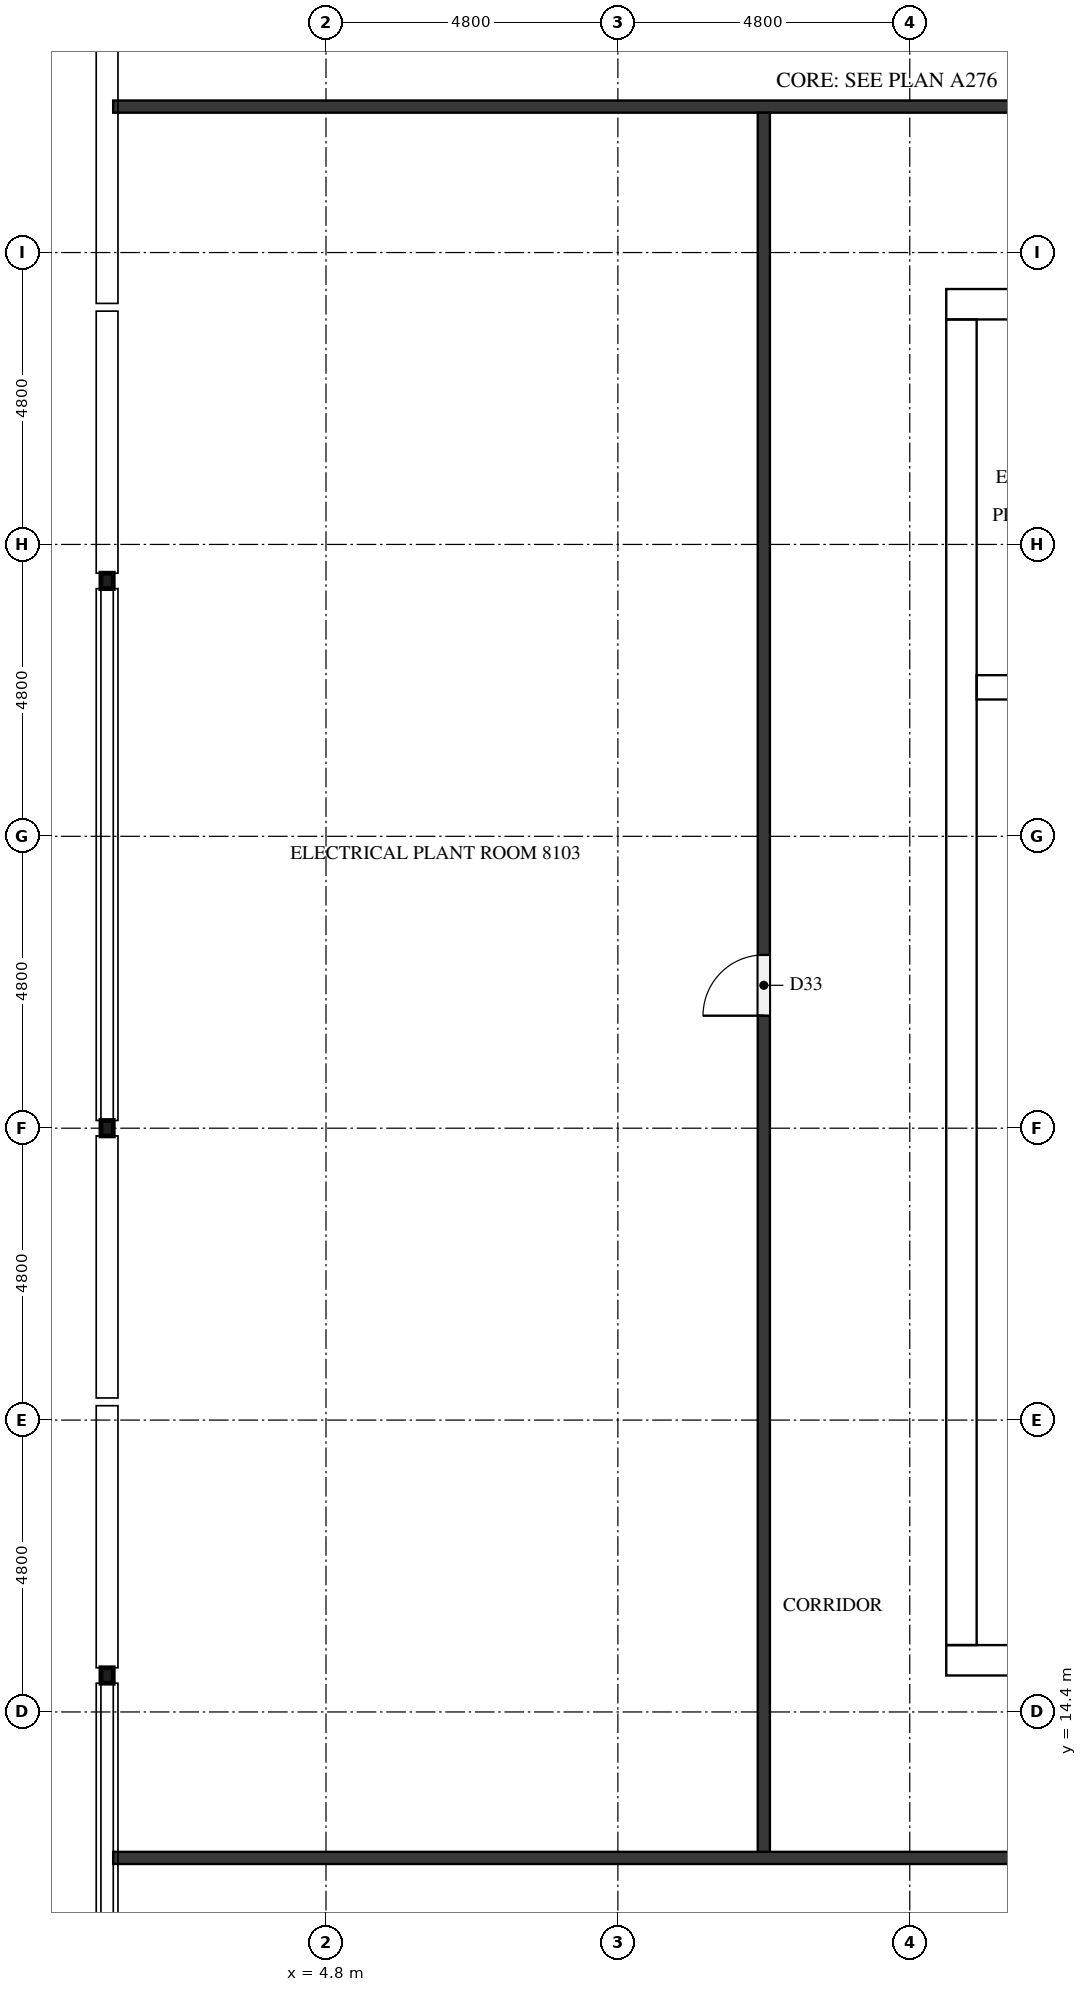
"""IFC4 building model, lengths in metres.
Left out: names, types, materials, properties, quantities, classifications, styles, units other than length and angle.
Written with IfcOpenShell. Run it as: python <this file> out.ifc"""

import sys

from ifc_helpers import new_model, si_unit, direction, frame, frame_2d, origin, origin_2d, place, context, subcontext, project, spatial, rectangle, hollow_rectangle, extrude, element, fill, save


model = new_model("IFC4")
c1 = context("Model", 3, precision=1e-05, world=origin(), true_north=direction((0.0, 1.0)))
c2 = subcontext(c1, "Body", "Model", "MODEL_VIEW")
j1 = project(units=[si_unit("LENGTHUNIT", "METRE"), si_unit("PLANEANGLEUNIT", "RADIAN")], contexts=[c1])
p1 = place(None, origin())
s1 = spatial("IfcSite", under=j1, at=p1, CompositionType="ELEMENT")
p2 = place(p1, origin())
s2 = spatial("IfcBuilding", under=s1, at=p2, CompositionType="ELEMENT")
p3 = place(p2, frame((0.0, 0.0, 314.3)))
s3 = spatial("IfcBuildingStorey", under=s2, at=p3, CompositionType="ELEMENT", Elevation=314.3)
p4 = place(p3, frame((15.0, 15.25, 0.0), z_axis=(0.0, 0.0, 1.0), x_axis=(1.0, 0.0, 0.0)))
e1 = element("IfcWall", 1, at=p4, inside=s3, PredefinedType="SHEAR", context=c2, shape_type="SweptSolid", body=[
    extrude(rectangle(XDim=32.4, YDim=0.5, at=frame_2d((16.2, 0.0))), origin(), (0.0, 0.0, 1.0), 2.6),
])
p5 = place(p4, frame((15.3, 0.0, 0.0)))
e2 = element("IfcOpeningElement", 2, at=p5, cuts=e1, PredefinedType="OPENING", context=c2, shape_type="SweptSolid", body=[
    extrude(rectangle(XDim=1.8, YDim=2.1, at=frame_2d((0.9, 1.05))), frame((0.0, 0.26, 0.0), z_axis=(0.0, -1.0, 0.0), x_axis=(1.0, 0.0, 0.0)), (0.0, 0.0, 1.0), 0.52),
])
p6 = place(p3, frame((15.0, 37.55, 0.0), z_axis=(0.0, 0.0, 1.0), x_axis=(1.0, 0.0, 0.0)))
e3 = element("IfcWall", 3, at=p6, inside=s3, PredefinedType="SHEAR", context=c2, shape_type="SweptSolid", body=[
    extrude(rectangle(XDim=32.4, YDim=0.5, at=frame_2d((16.2, 0.0))), origin(), (0.0, 0.0, 1.0), 2.6),
])
p7 = place(p6, frame((15.3, 0.0, 0.0)))
e4 = element("IfcOpeningElement", 4, at=p7, cuts=e3, PredefinedType="OPENING", context=c2, shape_type="SweptSolid", body=[
    extrude(rectangle(XDim=1.8, YDim=2.1, at=frame_2d((0.9, 1.05))), frame((0.0, 0.26, 0.0), z_axis=(0.0, -1.0, 0.0), x_axis=(1.0, 0.0, 0.0)), (0.0, 0.0, 1.0), 0.52),
])
p8 = place(p6, frame((1.282, 0.0, 0.0)))
e5 = element("IfcOpeningElement", 5, at=p8, cuts=e3, PredefinedType="OPENING", context=c2, shape_type="SweptSolid", body=[
    extrude(rectangle(XDim=1.0, YDim=2.1, at=frame_2d((0.5, 1.05))), frame((0.0, 0.26, 0.0), z_axis=(0.0, -1.0, 0.0), x_axis=(1.0, 0.0, 0.0)), (0.0, 0.0, 1.0), 0.52),
])
p9 = place(p6, frame((5.082, 0.0, 0.0)))
e6 = element("IfcOpeningElement", 6, at=p9, cuts=e3, PredefinedType="OPENING", context=c2, shape_type="SweptSolid", body=[
    extrude(rectangle(XDim=1.0, YDim=2.1, at=frame_2d((0.5, 1.05))), frame((0.0, 0.26, 0.0), z_axis=(0.0, -1.0, 0.0), x_axis=(1.0, 0.0, 0.0)), (0.0, 0.0, 1.0), 0.52),
])
p10 = place(p3, frame((15.25, 15.5, 0.0), z_axis=(0.0, 0.0, 1.0), x_axis=(0.0, 1.0, 0.0)))
e7 = element("IfcWall", 7, at=p10, inside=s3, PredefinedType="SHEAR", context=c2, shape_type="SweptSolid", body=[
    extrude(rectangle(XDim=21.8, YDim=0.5, at=frame_2d((10.9, 0.0))), origin(), (0.0, 0.0, 1.0), 2.6),
])
p11 = place(p10, frame((5.26, 0.0, 0.0)))
e8 = element("IfcOpeningElement", 8, at=p11, cuts=e7, PredefinedType="OPENING", context=c2, shape_type="SweptSolid", body=[
    extrude(rectangle(XDim=1.2, YDim=2.1, at=frame_2d((0.6, 1.05))), frame((0.0, 0.26, 0.0), z_axis=(0.0, -1.0, 0.0), x_axis=(1.0, 0.0, 0.0)), (0.0, 0.0, 1.0), 0.52),
])
p12 = place(p3, frame((15.5, 31.25, 0.0), z_axis=(0.0, 0.0, 1.0), x_axis=(1.0, 0.0, 0.0)))
e9 = element("IfcWall", 9, at=p12, inside=s3, PredefinedType="SHEAR", context=c2, shape_type="SweptSolid", body=[
    extrude(rectangle(XDim=7.4, YDim=0.4, at=frame_2d((3.7, 0.0))), origin(), (0.0, 0.0, 1.0), 2.6),
])
for number, where, z_axis, x_axis in (
    (10, (1.2, 33.0, 0.0), (0.0, 0.0, 1.0), (1.0, 0.0, 0.0)),
    (11, (1.2, 24.0, 0.0), (0.0, 0.0, 1.0), (1.0, 0.0, 0.0)),
    (12, (1.2, 15.0, 0.0), (0.0, 0.0, 1.0), (1.0, 0.0, 0.0)),
):
    element("IfcColumn", number, at=place(p3, frame(where, z_axis=z_axis, x_axis=x_axis)), inside=s3, PredefinedType="COLUMN", context=c2, shape_type="SweptSolid", body=[
        extrude(hollow_rectangle(XDim=0.203, YDim=0.254, WallThickness=0.01, InnerFilletRadius=0.004, OuterFilletRadius=0.013, at=origin_2d()), origin(), (0.0, 0.0, 1.0), 2.6),
    ])
p13 = place(p3, frame((56.3, 12.0, 0.0), z_axis=(0.0, 0.0, 1.0), x_axis=(-1.0, 0.0, 0.0)))
e13 = element("IfcWall", 13, at=p13, inside=s3, PredefinedType="PARTITIONING", context=c2, shape_type="SweptSolid", body=[
    extrude(rectangle(XDim=55.0, YDim=0.2, at=frame_2d((27.5, 0.0))), origin(), (0.0, 0.0, 1.0), 2.6),
])
p14 = place(p13, frame((24.55, 0.0, 0.0)))
e14 = element("IfcOpeningElement", 14, at=p14, cuts=e13, PredefinedType="OPENING", context=c2, shape_type="SweptSolid", body=[
    extrude(rectangle(XDim=1.0, YDim=2.1, at=frame_2d((0.5, 1.05))), frame((0.0, 0.11, 0.0), z_axis=(0.0, -1.0, 0.0), x_axis=(1.0, 0.0, 0.0)), (0.0, 0.0, 1.0), 0.22),
])
p15 = place(p3, frame((1.3, 40.8, 0.0), z_axis=(0.0, 0.0, 1.0), x_axis=(1.0, 0.0, 0.0)))
e15 = element("IfcWall", 15, at=p15, inside=s3, PredefinedType="PARTITIONING", context=c2, shape_type="SweptSolid", body=[
    extrude(rectangle(XDim=55.0, YDim=0.2, at=frame_2d((27.5, 0.0))), origin(), (0.0, 0.0, 1.0), 2.6),
])
p16 = place(p15, frame((29.35, 0.0, 0.0)))
e16 = element("IfcOpeningElement", 16, at=p16, cuts=e15, PredefinedType="OPENING", context=c2, shape_type="SweptSolid", body=[
    extrude(rectangle(XDim=1.0, YDim=2.1, at=frame_2d((0.5, 1.05))), frame((0.0, 0.11, 0.0), z_axis=(0.0, -1.0, 0.0), x_axis=(1.0, 0.0, 0.0)), (0.0, 0.0, 1.0), 0.22),
])
p17 = place(p3, frame((12.0, 12.1, 0.0), z_axis=(0.0, 0.0, 1.0), x_axis=(0.0, 1.0, 0.0)))
e17 = element("IfcWall", 17, at=p17, inside=s3, PredefinedType="PARTITIONING", context=c2, shape_type="SweptSolid", body=[
    extrude(rectangle(XDim=28.6, YDim=0.2, at=frame_2d((14.3, 0.0))), origin(), (0.0, 0.0, 1.0), 2.6),
])
p18 = place(p17, frame((13.75, 0.0, 0.0)))
e18 = element("IfcOpeningElement", 18, at=p18, cuts=e17, PredefinedType="OPENING", context=c2, shape_type="SweptSolid", body=[
    extrude(rectangle(XDim=1.0, YDim=2.1, at=frame_2d((0.5, 1.05))), frame((0.0, 0.11, 0.0), z_axis=(0.0, -1.0, 0.0), x_axis=(1.0, 0.0, 0.0)), (0.0, 0.0, 1.0), 0.22),
])
p19 = place(p11, frame((1.2, 0.0, 0.0), z_axis=(0.0, 0.0, 1.0), x_axis=(-1.0, 0.0, 0.0)))
e19 = element("IfcDoor", 19, at=p19, inside=s3, OperationType="SINGLE_SWING_RIGHT", PredefinedType="DOOR", context=c2, shape_type="SweptSolid", body=[
    extrude(rectangle(XDim=1.2, YDim=2.1, at=frame_2d((0.6, 1.05))), frame((0.0, 0.025, 0.0), z_axis=(0.0, -1.0, 0.0), x_axis=(1.0, 0.0, 0.0)), (0.0, 0.0, 1.0), 0.05),
])
fill(e8, e19)
p20 = place(p18, origin())
e20 = element("IfcDoor", 20, at=p20, inside=s3, OperationType="SINGLE_SWING_LEFT", PredefinedType="DOOR", context=c2, shape_type="SweptSolid", body=[
    extrude(rectangle(XDim=1.0, YDim=2.1, at=frame_2d((0.5, 1.05))), frame((0.0, 0.025, 0.0), z_axis=(0.0, -1.0, 0.0), x_axis=(1.0, 0.0, 0.0)), (0.0, 0.0, 1.0), 0.05),
])
fill(e18, e20)
save(model, sys.argv[1])
